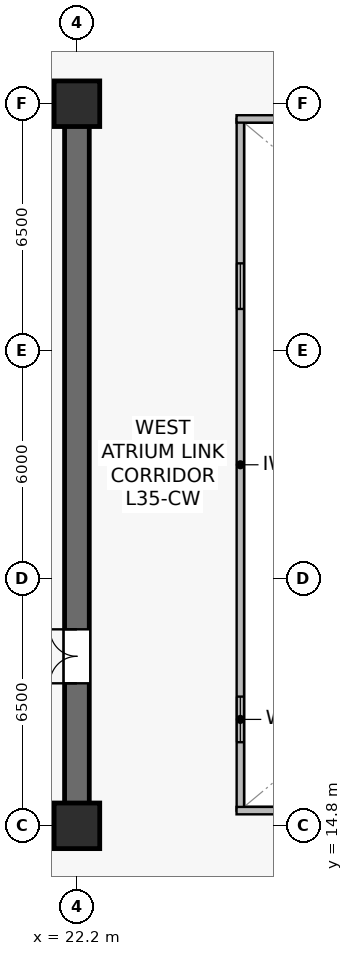
"""IFC4 building model, lengths in metres.
Left out: names, types, materials, properties, quantities, classifications, styles, units other than length and angle.
Written with IfcOpenShell. Run it as: python <this file> out.ifc"""

import sys

from ifc_helpers import new_model, si_unit, direction, frame, frame_2d, origin, origin_2d, place, context, subcontext, project, spatial, rectangle, extrude, source, transform, mapped, element, fill, save


model = new_model("IFC4")
c1 = context("Model", 3, precision=1e-05, world=origin(), true_north=direction((0.0, 1.0)))
c2 = subcontext(c1, "Body", "Model", "MODEL_VIEW")
j1 = project(units=[si_unit("LENGTHUNIT", "METRE"), si_unit("PLANEANGLEUNIT", "RADIAN")], contexts=[c1])
p1 = place(None, origin())
s1 = spatial("IfcSite", under=j1, at=p1, CompositionType="ELEMENT")
p2 = place(p1, origin())
s2 = spatial("IfcBuilding", under=s1, at=p2, CompositionType="ELEMENT")
p3 = place(p2, frame((0.0, 0.0, 146.1)))
s3 = spatial("IfcBuildingStorey", under=s2, at=p3, CompositionType="ELEMENT", Elevation=146.1)
p4 = place(p3, frame((7.075, 14.8, 0.0), z_axis=(0.0, 0.0, 1.0), x_axis=(1.0, 0.0, 0.0)))
e1 = element("IfcWall", 1, at=p4, inside=s3, PredefinedType="SHEAR", context=c2, shape_type="SweptSolid", body=[
    extrude(rectangle(XDim=15.45, YDim=0.65, at=frame_2d((7.725, 0.0))), origin(), (0.0, 0.0, 1.0), 3.79),
])
p5 = place(p3, frame((7.075, 33.8, 0.0), z_axis=(0.0, 0.0, 1.0), x_axis=(1.0, 0.0, 0.0)))
e2 = element("IfcWall", 2, at=p5, inside=s3, PredefinedType="SHEAR", context=c2, shape_type="SweptSolid", body=[
    extrude(rectangle(XDim=15.45, YDim=0.65, at=frame_2d((7.725, 0.0))), origin(), (0.0, 0.0, 1.0), 3.79),
])
p6 = place(p5, frame((6.825, 0.0, 0.0)))
e3 = element("IfcOpeningElement", 3, at=p6, cuts=e2, PredefinedType="OPENING", context=c2, shape_type="SweptSolid", body=[
    extrude(rectangle(XDim=0.95, YDim=2.15, at=frame_2d((0.475, 1.075))), frame((0.0, 0.335, 0.0), z_axis=(0.0, -1.0, 0.0), x_axis=(1.0, 0.0, 0.0)), (0.0, 0.0, 1.0), 0.67),
])
p7 = place(p5, frame((11.89, 0.0, 0.0)))
e4 = element("IfcOpeningElement", 4, at=p7, cuts=e2, PredefinedType="OPENING", context=c2, shape_type="SweptSolid", body=[
    extrude(rectangle(XDim=0.95, YDim=2.15, at=frame_2d((0.475, 1.075))), frame((0.0, 0.335, 0.0), z_axis=(0.0, -1.0, 0.0), x_axis=(1.0, 0.0, 0.0)), (0.0, 0.0, 1.0), 0.67),
])
p8 = place(p3, frame((22.2, 15.125, 0.0), z_axis=(0.0, 0.0, 1.0), x_axis=(0.0, 1.0, 0.0)))
e5 = element("IfcWall", 5, at=p8, inside=s3, PredefinedType="SHEAR", context=c2, shape_type="SweptSolid", body=[
    extrude(rectangle(XDim=18.35, YDim=0.65, at=frame_2d((9.175, 0.0))), origin(), (0.0, 0.0, 1.0), 3.79),
])
p9 = place(p8, frame((3.425, 0.0, 0.0)))
e6 = element("IfcOpeningElement", 6, at=p9, cuts=e5, PredefinedType="OPENING", context=c2, shape_type="SweptSolid", body=[
    extrude(rectangle(XDim=1.42, YDim=2.2, at=frame_2d((0.71, 1.1))), frame((0.0, 0.335, 0.0), z_axis=(0.0, -1.0, 0.0), x_axis=(1.0, 0.0, 0.0)), (0.0, 0.0, 1.0), 0.67),
])
m1 = source(origin(), c2, "Body", "SweptSolid", [
    extrude(rectangle(XDim=1.2, YDim=1.2, at=origin_2d()), origin(), (0.0, 0.0, 1.0), 4.1),
])
for number, where, z_axis, x_axis in (
    (7, (22.2, 14.8, 0.0), (0.0, 0.0, 1.0), (1.0, 0.0, 0.0)),
    (8, (22.2, 33.8, 0.0), (0.0, 0.0, 1.0), (1.0, 0.0, 0.0)),
):
    element("IfcColumn", number, at=place(p3, frame(where, z_axis=z_axis, x_axis=x_axis)), inside=s3, PredefinedType="COLUMN", context=c2, shape_type="MappedRepresentation", body=[
        mapped(m1, transform((0.0, 0.0, 0.0), scale=1.0)),
    ])
p10 = place(p3, frame((26.5, 15.2, 0.0), z_axis=(0.0, 0.0, 1.0), x_axis=(0.0, 1.0, 0.0)))
e9 = element("IfcWall", 9, at=p10, inside=s3, PredefinedType="SOLIDWALL", context=c2, shape_type="SweptSolid", body=[
    extrude(rectangle(XDim=18.2, YDim=0.195, at=frame_2d((9.1, 0.0))), origin(), (0.0, 0.0, 1.0), 3.79),
])
p11 = place(p10, frame((1.8, 0.0, 0.9)))
e10 = element("IfcOpeningElement", 10, at=p11, cuts=e9, PredefinedType="OPENING", context=c2, shape_type="SweptSolid", body=[
    extrude(rectangle(XDim=1.2, YDim=1.35, at=frame_2d((0.6, 0.675))), frame((0.0, 0.107, 0.0), z_axis=(0.0, -1.0, 0.0), x_axis=(1.0, 0.0, 0.0)), (0.0, 0.0, 1.0), 0.215),
])
p12 = place(p10, frame((13.2, 0.0, 0.9)))
e11 = element("IfcOpeningElement", 11, at=p12, cuts=e9, PredefinedType="OPENING", context=c2, shape_type="SweptSolid", body=[
    extrude(rectangle(XDim=1.2, YDim=1.35, at=frame_2d((0.6, 0.675))), frame((0.0, 0.107, 0.0), z_axis=(0.0, -1.0, 0.0), x_axis=(1.0, 0.0, 0.0)), (0.0, 0.0, 1.0), 0.215),
])
for number, where, z_axis, x_axis in (
    (12, (26.4, 15.2, 0.0), (0.0, 0.0, 1.0), (1.0, 0.0, 0.0)),
    (13, (26.4, 33.4, 0.0), (0.0, 0.0, 1.0), (1.0, 0.0, 0.0)),
):
    element("IfcWall", number, at=place(p3, frame(where, z_axis=z_axis, x_axis=x_axis)), inside=s3, PredefinedType="SOLIDWALL", context=c2, shape_type="SweptSolid", body=[
        extrude(rectangle(XDim=22.0, YDim=0.195, at=frame_2d((11.0, 0.0))), origin(), (0.0, 0.0, 1.0), 3.79),
    ])
m2 = source(origin(), c2, "Body", "SweptSolid", [
    extrude(rectangle(XDim=1.2, YDim=1.35, at=frame_2d((0.6, 0.675))), frame((0.0, 0.03, 0.0), z_axis=(0.0, -1.0, 0.0), x_axis=(1.0, 0.0, 0.0)), (0.0, 0.0, 1.0), 0.06),
])
p13 = place(p11, origin())
e14 = element("IfcWindow", 14, at=p13, inside=s3, PartitioningType="SINGLE_PANEL", PredefinedType="WINDOW", context=c2, shape_type="MappedRepresentation", body=[
    mapped(m2, transform((0.0, 0.0, 0.0), scale=1.0)),
])
fill(e10, e14)
p14 = place(p12, origin())
e15 = element("IfcWindow", 15, at=p14, inside=s3, PartitioningType="SINGLE_PANEL", PredefinedType="WINDOW", context=c2, shape_type="MappedRepresentation", body=[
    mapped(m2, transform((0.0, 0.0, 0.0), scale=1.0)),
])
fill(e11, e15)
m3 = source(origin(), c2, "Body", "SweptSolid", [
    extrude(rectangle(XDim=1.42, YDim=2.2, at=frame_2d((0.71, 1.1))), frame((0.0, 0.025, 0.0), z_axis=(0.0, -1.0, 0.0), x_axis=(1.0, 0.0, 0.0)), (0.0, 0.0, 1.0), 0.05),
])
p15 = place(p9, origin())
e16 = element("IfcDoor", 16, at=p15, inside=s3, OperationType="DOUBLE_DOOR_SINGLE_SWING", PredefinedType="DOOR", context=c2, shape_type="MappedRepresentation", body=[
    mapped(m3, transform((0.0, 0.0, 0.0), scale=1.0)),
])
fill(e6, e16)
save(model, sys.argv[1])
